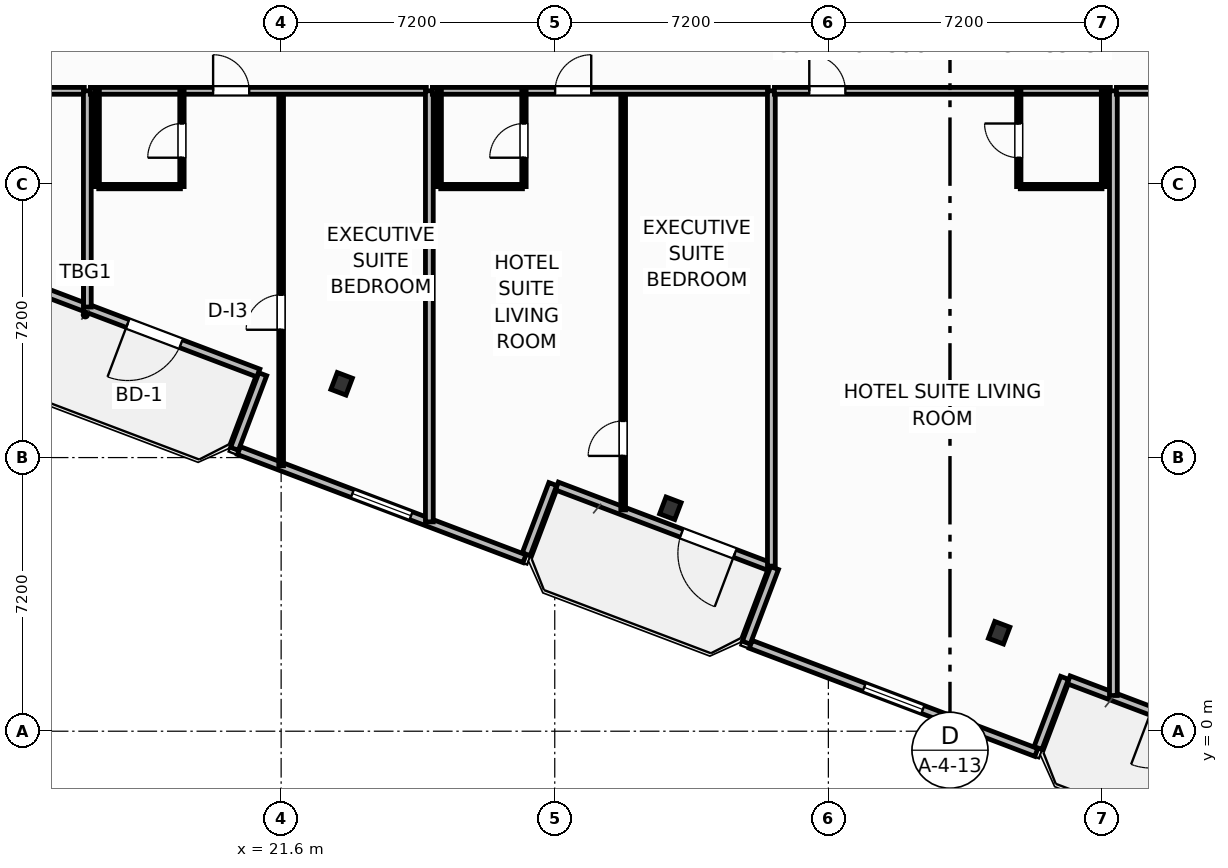
"""IFC4 building model, lengths in metres.
Left out: names, types, materials, properties, quantities, classifications, styles, units other than length and angle.
Written with IfcOpenShell. Run it as: python <this file> out.ifc"""

import sys

from ifc_helpers import new_model, si_unit, direction, frame, frame_2d, origin, origin_2d, place, context, subcontext, project, spatial, rectangle, i_section, extrude, element, fill, save


model = new_model("IFC4")
c1 = context("Model", 3, precision=1e-05, world=origin(), true_north=direction((0.0, 1.0)))
c2 = subcontext(c1, "Body", "Model", "MODEL_VIEW")
j1 = project(units=[si_unit("LENGTHUNIT", "METRE"), si_unit("PLANEANGLEUNIT", "RADIAN")], contexts=[c1])
p1 = place(None, origin())
s1 = spatial("IfcSite", under=j1, at=p1, CompositionType="ELEMENT")
p2 = place(p1, origin())
s2 = spatial("IfcBuilding", under=s1, at=p2, CompositionType="ELEMENT")
p3 = place(p2, frame((0.0, 0.0, 76.2)))
s3 = spatial("IfcBuildingStorey", under=s2, at=p3, CompositionType="ELEMENT", Elevation=76.2)
for number, where, z_axis, x_axis in (
    (1, (23.192, 9.141, 0.0), (0.0, 0.0, 1.0), (0.935, -0.354, 0.0)),
    (2, (31.843, 5.866, 0.0), (0.0, 0.0, 1.0), (0.935, -0.354, 0.0)),
    (3, (40.493, 2.591, 0.0), (0.0, 0.0, 1.0), (0.935, -0.354, 0.0)),
):
    element("IfcColumn", number, at=place(p3, frame(where, z_axis=z_axis, x_axis=x_axis)), inside=s3, PredefinedType="COLUMN", context=c2, shape_type="SweptSolid", body=[
        extrude(i_section(OverallWidth=0.424, OverallDepth=0.474, WebThickness=0.048, FlangeThickness=0.077, FilletRadius=0.025, at=origin_2d()), origin(), (0.0, 0.0, 1.0), 3.7),
    ])
p4 = place(p3, frame((21.0, 9.425, 0.0), z_axis=(0.0, 0.0, 1.0), x_axis=(-0.93521416643, 0.354082565101, 0.0)))
e4 = element("IfcWall", 4, at=p4, inside=s3, PredefinedType="SOLIDWALL", context=c2, shape_type="SweptSolid", body=[
    extrude(rectangle(XDim=6.0, YDim=0.22, at=frame_2d((3.0, 0.0))), origin(), (0.0, 0.0, 1.0), 2.73),
])
p5 = place(p4, frame((2.176, 0.0, 0.0)))
e5 = element("IfcOpeningElement", 5, at=p5, cuts=e4, PredefinedType="OPENING", context=c2, shape_type="SweptSolid", body=[
    extrude(rectangle(XDim=1.5, YDim=2.25, at=frame_2d((0.75, 1.125))), frame((0.0, 0.12, 0.0), z_axis=(0.0, -1.0, 0.0), x_axis=(1.0, 0.0, 0.0)), (0.0, 0.0, 1.0), 0.24),
])
p6 = place(p3, frame((34.468, 4.327, 0.0), z_axis=(0.0, 0.0, 1.0), x_axis=(-0.9352192676, 0.354069091436, 0.0)))
e6 = element("IfcWall", 6, at=p6, inside=s3, PredefinedType="SOLIDWALL", context=c2, shape_type="SweptSolid", body=[
    extrude(rectangle(XDim=6.0, YDim=0.22, at=frame_2d((3.0, 0.0))), origin(), (0.0, 0.0, 1.0), 2.73),
])
p7 = place(p6, frame((0.992, 0.0, 0.0)))
e7 = element("IfcOpeningElement", 7, at=p7, cuts=e6, PredefinedType="OPENING", context=c2, shape_type="SweptSolid", body=[
    extrude(rectangle(XDim=1.5, YDim=2.25, at=frame_2d((0.75, 1.125))), frame((0.0, 0.12, 0.0), z_axis=(0.0, -1.0, 0.0), x_axis=(1.0, 0.0, 0.0)), (0.0, 0.0, 1.0), 0.24),
])
p8 = place(p3, frame((47.935, -0.771, 0.0), z_axis=(0.0, 0.0, 1.0), x_axis=(-0.935227640088, 0.354046976001, 0.0)))
e8 = element("IfcWall", 8, at=p8, inside=s3, PredefinedType="SOLIDWALL", context=c2, shape_type="SweptSolid", body=[
    extrude(rectangle(XDim=6.0, YDim=0.22, at=frame_2d((3.0, 0.0))), origin(), (0.0, 0.0, 1.0), 2.73),
])
p9 = place(p8, frame((2.176, 0.0, 0.0)))
e9 = element("IfcOpeningElement", 9, at=p9, cuts=e8, PredefinedType="OPENING", context=c2, shape_type="SweptSolid", body=[
    extrude(rectangle(XDim=1.5, YDim=2.25, at=frame_2d((0.75, 1.125))), frame((0.0, 0.12, 0.0), z_axis=(0.0, -1.0, 0.0), x_axis=(1.0, 0.0, 0.0)), (0.0, 0.0, 1.0), 0.24),
])
p10 = place(p3, frame((21.116, 9.392, 0.0), z_axis=(0.0, 0.0, 1.0), x_axis=(-0.353988291547, -0.935249854022, 0.0)))
e10 = element("IfcWall", 10, at=p10, inside=s3, PredefinedType="SOLIDWALL", context=c2, shape_type="SweptSolid", body=[
    extrude(rectangle(XDim=2.1, YDim=0.22, at=frame_2d((1.05, 0.0))), origin(), (0.0, 0.0, 1.0), 2.73),
])
p11 = place(p3, frame((20.49, 7.384, 0.0), z_axis=(0.0, 0.0, 1.0), x_axis=(0.935230796934, -0.354038636968, 0.0)))
e11 = element("IfcWall", 11, at=p11, inside=s3, PredefinedType="SOLIDWALL", context=c2, shape_type="SweptSolid", body=[
    extrude(rectangle(XDim=8.035, YDim=0.22, at=frame_2d((4.018, 0.0))), origin(), (0.0, 0.0, 1.0), 2.73),
])
p12 = place(p11, frame((3.192, 0.0, 0.8)))
e12 = element("IfcOpeningElement", 12, at=p12, cuts=e11, PredefinedType="OPENING", context=c2, shape_type="SweptSolid", body=[
    extrude(rectangle(XDim=1.65, YDim=1.65, at=frame_2d((0.825, 0.825))), frame((0.0, 0.12, 0.0), z_axis=(0.0, -1.0, 0.0), x_axis=(1.0, 0.0, 0.0)), (0.0, 0.0, 1.0), 0.24),
])
p13 = place(p3, frame((28.048, 4.656, 0.0), z_axis=(0.0, 0.0, 1.0), x_axis=(0.354128791944, 0.935196663123, 0.0)))
e13 = element("IfcWall", 13, at=p13, inside=s3, PredefinedType="SOLIDWALL", context=c2, shape_type="SweptSolid", body=[
    extrude(rectangle(XDim=1.975, YDim=0.22, at=frame_2d((0.988, 0.0))), origin(), (0.0, 0.0, 1.0), 2.73),
])
p14 = place(p3, frame((34.583, 4.294, 0.0), z_axis=(0.0, 0.0, 1.0), x_axis=(-0.354128469405, -0.935196785258, 0.0)))
e14 = element("IfcWall", 14, at=p14, inside=s3, PredefinedType="SOLIDWALL", context=c2, shape_type="SweptSolid", body=[
    extrude(rectangle(XDim=2.1, YDim=0.22, at=frame_2d((1.05, 0.0))), origin(), (0.0, 0.0, 1.0), 2.73),
])
p15 = place(p3, frame((33.957, 2.286, 0.0), z_axis=(0.0, 0.0, 1.0), x_axis=(0.935220736163, -0.354065212427, 0.0)))
e15 = element("IfcWall", 15, at=p15, inside=s3, PredefinedType="SOLIDWALL", context=c2, shape_type="SweptSolid", body=[
    extrude(rectangle(XDim=8.035, YDim=0.22, at=frame_2d((4.018, 0.0))), origin(), (0.0, 0.0, 1.0), 2.73),
])
p16 = place(p15, frame((3.192, 0.0, 0.8)))
e16 = element("IfcOpeningElement", 16, at=p16, cuts=e15, PredefinedType="OPENING", context=c2, shape_type="SweptSolid", body=[
    extrude(rectangle(XDim=1.65, YDim=1.65, at=frame_2d((0.825, 0.825))), frame((0.0, 0.12, 0.0), z_axis=(0.0, -1.0, 0.0), x_axis=(1.0, 0.0, 0.0)), (0.0, 0.0, 1.0), 0.24),
])
p17 = place(p3, frame((41.516, -0.442, 0.0), z_axis=(0.0, 0.0, 1.0), x_axis=(0.354061611705, 0.935222099352, 0.0)))
e17 = element("IfcWall", 17, at=p17, inside=s3, PredefinedType="SOLIDWALL", context=c2, shape_type="SweptSolid", body=[
    extrude(rectangle(XDim=1.975, YDim=0.22, at=frame_2d((0.987, 0.0))), origin(), (0.0, 0.0, 1.0), 2.73),
])
p18 = place(p3, frame((1.58, 16.85, 0.0), z_axis=(0.0, 0.0, 1.0), x_axis=(1.0, 0.0, 0.0)))
e18 = element("IfcWall", 18, at=p18, inside=s3, PredefinedType="PARTITIONING", context=c2, shape_type="SweptSolid", body=[
    extrude(rectangle(XDim=14.84, YDim=0.18, at=frame_2d((7.42, 0.0))), origin(), (0.0, 0.0, 1.0), 3.45),
])
p19 = place(p18, frame((11.705, 0.0, 0.0)))
e19 = element("IfcOpeningElement", 19, at=p19, cuts=e18, PredefinedType="OPENING", context=c2, shape_type="SweptSolid", body=[
    extrude(rectangle(XDim=0.95, YDim=2.15, at=frame_2d((0.475, 1.075))), frame((0.0, 0.1, 0.0), z_axis=(0.0, -1.0, 0.0), x_axis=(1.0, 0.0, 0.0)), (0.0, 0.0, 1.0), 0.2),
])
p20 = place(p3, frame((16.5, 11.161, 0.0), z_axis=(0.0, 0.0, 1.0), x_axis=(0.0, 1.0, 0.0)))
e20 = element("IfcWall", 20, at=p20, inside=s3, PredefinedType="PARTITIONING", context=c2, shape_type="SweptSolid", body=[
    extrude(rectangle(XDim=5.689, YDim=0.205, at=frame_2d((2.844, 0.0))), origin(), (0.0, 0.0, 1.0), 3.45),
])
p21 = place(p3, frame((21.6, 6.985, 0.0), z_axis=(0.0, 0.0, 1.0), x_axis=(0.0, 1.0, 0.0)))
e21 = element("IfcWall", 21, at=p21, inside=s3, PredefinedType="PARTITIONING", context=c2, shape_type="SweptSolid", body=[
    extrude(rectangle(XDim=9.865, YDim=0.125, at=frame_2d((4.933, 0.0))), origin(), (0.0, 0.0, 1.0), 3.45),
])
p22 = place(p21, frame((3.578, 0.0, 0.0)))
e22 = element("IfcOpeningElement", 22, at=p22, cuts=e21, PredefinedType="OPENING", context=c2, shape_type="SweptSolid", body=[
    extrude(rectangle(XDim=0.92, YDim=2.05, at=frame_2d((0.46, 1.025))), frame((0.0, 0.073, 0.0), z_axis=(0.0, -1.0, 0.0), x_axis=(1.0, 0.0, 0.0)), (0.0, 0.0, 1.0), 0.145),
])
p23 = place(p3, frame((16.58, 16.85, 0.0), z_axis=(0.0, 0.0, 1.0), x_axis=(1.0, 0.0, 0.0)))
e23 = element("IfcWall", 23, at=p23, inside=s3, PredefinedType="PARTITIONING", context=c2, shape_type="SweptSolid", body=[
    extrude(rectangle(XDim=8.84, YDim=0.18, at=frame_2d((4.42, 0.0))), origin(), (0.0, 0.0, 1.0), 3.45),
])
p24 = place(p23, frame((3.23, 0.0, 0.0)))
e24 = element("IfcOpeningElement", 24, at=p24, cuts=e23, PredefinedType="OPENING", context=c2, shape_type="SweptSolid", body=[
    extrude(rectangle(XDim=0.95, YDim=2.15, at=frame_2d((0.475, 1.075))), frame((0.0, 0.1, 0.0), z_axis=(0.0, -1.0, 0.0), x_axis=(1.0, 0.0, 0.0)), (0.0, 0.0, 1.0), 0.2),
])
p25 = place(p3, frame((16.8, 14.33, 0.0), z_axis=(0.0, 0.0, 1.0), x_axis=(1.0, 0.0, 0.0)))
e25 = element("IfcWall", 25, at=p25, inside=s3, PredefinedType="PARTITIONING", context=c2, shape_type="SweptSolid", body=[
    extrude(rectangle(XDim=2.15, YDim=0.115, at=frame_2d((1.075, 0.0))), origin(), (0.0, 0.0, 1.0), 3.45),
])
p26 = place(p3, frame((18.99, 14.33, 0.0), z_axis=(0.0, 0.0, 1.0), x_axis=(0.0, 1.0, 0.0)))
e26 = element("IfcWall", 26, at=p26, inside=s3, PredefinedType="PARTITIONING", context=c2, shape_type="SweptSolid", body=[
    extrude(rectangle(XDim=2.52, YDim=0.115, at=frame_2d((1.26, 0.0))), origin(), (0.0, 0.0, 1.0), 3.45),
])
p27 = place(p26, frame((0.76, 0.0, 0.0)))
e27 = element("IfcOpeningElement", 27, at=p27, cuts=e26, PredefinedType="OPENING", context=c2, shape_type="SweptSolid", body=[
    extrude(rectangle(XDim=0.9, YDim=2.05, at=frame_2d((0.45, 1.025))), frame((0.0, 0.067, 0.0), z_axis=(0.0, -1.0, 0.0), x_axis=(1.0, 0.0, 0.0)), (0.0, 0.0, 1.0), 0.135),
])
p28 = place(p3, frame((16.76, 14.33, 0.0), z_axis=(0.0, 0.0, 1.0), x_axis=(0.0, 1.0, 0.0)))
e28 = element("IfcWall", 28, at=p28, inside=s3, PredefinedType="PARTITIONING", context=c2, shape_type="SweptSolid", body=[
    extrude(rectangle(XDim=2.52, YDim=0.115, at=frame_2d((1.26, 0.0))), origin(), (0.0, 0.0, 1.0), 3.45),
])
p29 = place(p3, frame((25.5, 5.509, 0.0), z_axis=(0.0, 0.0, 1.0), x_axis=(0.0, 1.0, 0.0)))
e29 = element("IfcWall", 29, at=p29, inside=s3, PredefinedType="PARTITIONING", context=c2, shape_type="SweptSolid", body=[
    extrude(rectangle(XDim=11.342, YDim=0.205, at=frame_2d((5.671, 0.0))), origin(), (0.0, 0.0, 1.0), 3.45),
])
p30 = place(p3, frame((30.6, 5.823, 0.0), z_axis=(0.0, 0.0, 1.0), x_axis=(0.0, 1.0, 0.0)))
e30 = element("IfcWall", 30, at=p30, inside=s3, PredefinedType="PARTITIONING", context=c2, shape_type="SweptSolid", body=[
    extrude(rectangle(XDim=11.027, YDim=0.125, at=frame_2d((5.513, 0.0))), origin(), (0.0, 0.0, 1.0), 3.45),
])
p31 = place(p30, frame((1.42, 0.0, 0.0)))
e31 = element("IfcOpeningElement", 31, at=p31, cuts=e30, PredefinedType="OPENING", context=c2, shape_type="SweptSolid", body=[
    extrude(rectangle(XDim=0.92, YDim=2.05, at=frame_2d((0.46, 1.025))), frame((0.0, 0.073, 0.0), z_axis=(0.0, -1.0, 0.0), x_axis=(1.0, 0.0, 0.0)), (0.0, 0.0, 1.0), 0.145),
])
p32 = place(p3, frame((25.58, 16.85, 0.0), z_axis=(0.0, 0.0, 1.0), x_axis=(1.0, 0.0, 0.0)))
e32 = element("IfcWall", 32, at=p32, inside=s3, PredefinedType="PARTITIONING", context=c2, shape_type="SweptSolid", body=[
    extrude(rectangle(XDim=8.84, YDim=0.18, at=frame_2d((4.42, 0.0))), origin(), (0.0, 0.0, 1.0), 3.45),
])
p33 = place(p32, frame((3.23, 0.0, 0.0)))
e33 = element("IfcOpeningElement", 33, at=p33, cuts=e32, PredefinedType="OPENING", context=c2, shape_type="SweptSolid", body=[
    extrude(rectangle(XDim=0.95, YDim=2.15, at=frame_2d((0.475, 1.075))), frame((0.0, 0.1, 0.0), z_axis=(0.0, -1.0, 0.0), x_axis=(1.0, 0.0, 0.0)), (0.0, 0.0, 1.0), 0.2),
])
p34 = place(p3, frame((25.8, 14.33, 0.0), z_axis=(0.0, 0.0, 1.0), x_axis=(1.0, 0.0, 0.0)))
e34 = element("IfcWall", 34, at=p34, inside=s3, PredefinedType="PARTITIONING", context=c2, shape_type="SweptSolid", body=[
    extrude(rectangle(XDim=2.15, YDim=0.115, at=frame_2d((1.075, 0.0))), origin(), (0.0, 0.0, 1.0), 3.45),
])
p35 = place(p3, frame((27.99, 14.33, 0.0), z_axis=(0.0, 0.0, 1.0), x_axis=(0.0, 1.0, 0.0)))
e35 = element("IfcWall", 35, at=p35, inside=s3, PredefinedType="PARTITIONING", context=c2, shape_type="SweptSolid", body=[
    extrude(rectangle(XDim=2.52, YDim=0.115, at=frame_2d((1.26, 0.0))), origin(), (0.0, 0.0, 1.0), 3.45),
])
p36 = place(p35, frame((0.76, 0.0, 0.0)))
e36 = element("IfcOpeningElement", 36, at=p36, cuts=e35, PredefinedType="OPENING", context=c2, shape_type="SweptSolid", body=[
    extrude(rectangle(XDim=0.9, YDim=2.05, at=frame_2d((0.45, 1.025))), frame((0.0, 0.067, 0.0), z_axis=(0.0, -1.0, 0.0), x_axis=(1.0, 0.0, 0.0)), (0.0, 0.0, 1.0), 0.135),
])
p37 = place(p3, frame((25.76, 14.33, 0.0), z_axis=(0.0, 0.0, 1.0), x_axis=(0.0, 1.0, 0.0)))
e37 = element("IfcWall", 37, at=p37, inside=s3, PredefinedType="PARTITIONING", context=c2, shape_type="SweptSolid", body=[
    extrude(rectangle(XDim=2.52, YDim=0.115, at=frame_2d((1.26, 0.0))), origin(), (0.0, 0.0, 1.0), 3.45),
])
p38 = place(p3, frame((34.5, 4.344, 0.0), z_axis=(0.0, 0.0, 1.0), x_axis=(0.0, 1.0, 0.0)))
e38 = element("IfcWall", 38, at=p38, inside=s3, PredefinedType="PARTITIONING", context=c2, shape_type="SweptSolid", body=[
    extrude(rectangle(XDim=12.506, YDim=0.205, at=frame_2d((6.253, 0.0))), origin(), (0.0, 0.0, 1.0), 3.45),
])
p39 = place(p3, frame((34.58, 16.85, 0.0), z_axis=(0.0, 0.0, 1.0), x_axis=(1.0, 0.0, 0.0)))
e39 = element("IfcWall", 39, at=p39, inside=s3, PredefinedType="PARTITIONING", context=c2, shape_type="SweptSolid", body=[
    extrude(rectangle(XDim=8.84, YDim=0.18, at=frame_2d((4.42, 0.0))), origin(), (0.0, 0.0, 1.0), 3.45),
])
p40 = place(p39, frame((0.918, 0.0, 0.0)))
e40 = element("IfcOpeningElement", 40, at=p40, cuts=e39, PredefinedType="OPENING", context=c2, shape_type="SweptSolid", body=[
    extrude(rectangle(XDim=0.95, YDim=2.15, at=frame_2d((0.475, 1.075))), frame((0.0, 0.1, 0.0), z_axis=(0.0, -1.0, 0.0), x_axis=(1.0, 0.0, 0.0)), (0.0, 0.0, 1.0), 0.2),
])
p41 = place(p3, frame((41.05, 14.33, 0.0), z_axis=(0.0, 0.0, 1.0), x_axis=(1.0, 0.0, 0.0)))
e41 = element("IfcWall", 41, at=p41, inside=s3, PredefinedType="PARTITIONING", context=c2, shape_type="SweptSolid", body=[
    extrude(rectangle(XDim=2.15, YDim=0.115, at=frame_2d((1.075, 0.0))), origin(), (0.0, 0.0, 1.0), 3.45),
])
p42 = place(p3, frame((41.01, 14.33, 0.0), z_axis=(0.0, 0.0, 1.0), x_axis=(0.0, 1.0, 0.0)))
e42 = element("IfcWall", 42, at=p42, inside=s3, PredefinedType="PARTITIONING", context=c2, shape_type="SweptSolid", body=[
    extrude(rectangle(XDim=2.52, YDim=0.115, at=frame_2d((1.26, 0.0))), origin(), (0.0, 0.0, 1.0), 3.45),
])
p43 = place(p42, frame((0.76, 0.0, 0.0)))
e43 = element("IfcOpeningElement", 43, at=p43, cuts=e42, PredefinedType="OPENING", context=c2, shape_type="SweptSolid", body=[
    extrude(rectangle(XDim=0.9, YDim=2.05, at=frame_2d((0.45, 1.025))), frame((0.0, 0.067, 0.0), z_axis=(0.0, -1.0, 0.0), x_axis=(1.0, 0.0, 0.0)), (0.0, 0.0, 1.0), 0.135),
])
p44 = place(p3, frame((43.24, 14.33, 0.0), z_axis=(0.0, 0.0, 1.0), x_axis=(0.0, 1.0, 0.0)))
e44 = element("IfcWall", 44, at=p44, inside=s3, PredefinedType="PARTITIONING", context=c2, shape_type="SweptSolid", body=[
    extrude(rectangle(XDim=2.52, YDim=0.115, at=frame_2d((1.26, 0.0))), origin(), (0.0, 0.0, 1.0), 2.58),
])
p45 = place(p3, frame((43.5, 0.939, 0.0), z_axis=(0.0, 0.0, 1.0), x_axis=(0.0, 1.0, 0.0)))
e45 = element("IfcWall", 45, at=p45, inside=s3, PredefinedType="PARTITIONING", context=c2, shape_type="SweptSolid", body=[
    extrude(rectangle(XDim=15.911, YDim=0.205, at=frame_2d((7.955, 0.0))), origin(), (0.0, 0.0, 1.0), 2.58),
])
p46 = place(p3, frame((43.58, 16.85, 0.0), z_axis=(0.0, 0.0, 1.0), x_axis=(1.0, 0.0, 0.0)))
e46 = element("IfcWall", 46, at=p46, inside=s3, PredefinedType="PARTITIONING", context=c2, shape_type="SweptSolid", body=[
    extrude(rectangle(XDim=8.84, YDim=0.18, at=frame_2d((4.42, 0.0))), origin(), (0.0, 0.0, 1.0), 3.45),
])
p47 = place(p46, frame((0.918, 0.0, 0.0)))
e47 = element("IfcOpeningElement", 47, at=p47, cuts=e46, PredefinedType="OPENING", context=c2, shape_type="SweptSolid", body=[
    extrude(rectangle(XDim=0.95, YDim=2.15, at=frame_2d((0.475, 1.075))), frame((0.0, 0.1, 0.0), z_axis=(0.0, -1.0, 0.0), x_axis=(1.0, 0.0, 0.0)), (0.0, 0.0, 1.0), 0.2),
])
p48 = place(p5, origin())
e48 = element("IfcDoor", 48, at=p48, inside=s3, OperationType="SINGLE_SWING_RIGHT", PredefinedType="DOOR", context=c2, shape_type="SweptSolid", body=[
    extrude(rectangle(XDim=1.5, YDim=2.25, at=frame_2d((0.75, 1.125))), frame((0.0, 0.025, 0.0), z_axis=(0.0, -1.0, 0.0), x_axis=(1.0, 0.0, 0.0)), (0.0, 0.0, 1.0), 0.05),
])
fill(e5, e48)
p49 = place(p7, origin())
e49 = element("IfcDoor", 49, at=p49, inside=s3, OperationType="SINGLE_SWING_LEFT", PredefinedType="DOOR", context=c2, shape_type="SweptSolid", body=[
    extrude(rectangle(XDim=1.5, YDim=2.25, at=frame_2d((0.75, 1.125))), frame((0.0, 0.025, 0.0), z_axis=(0.0, -1.0, 0.0), x_axis=(1.0, 0.0, 0.0)), (0.0, 0.0, 1.0), 0.05),
])
fill(e7, e49)
p50 = place(p12, origin())
e50 = element("IfcWindow", 50, at=p50, inside=s3, PartitioningType="SINGLE_PANEL", PredefinedType="WINDOW", context=c2, shape_type="SweptSolid", body=[
    extrude(rectangle(XDim=1.65, YDim=1.65, at=frame_2d((0.825, 0.825))), frame((0.0, 0.03, 0.0), z_axis=(0.0, -1.0, 0.0), x_axis=(1.0, 0.0, 0.0)), (0.0, 0.0, 1.0), 0.06),
])
fill(e12, e50)
p51 = place(p16, origin())
e51 = element("IfcWindow", 51, at=p51, inside=s3, PartitioningType="SINGLE_PANEL", PredefinedType="WINDOW", context=c2, shape_type="SweptSolid", body=[
    extrude(rectangle(XDim=1.65, YDim=1.65, at=frame_2d((0.825, 0.825))), frame((0.0, 0.03, 0.0), z_axis=(0.0, -1.0, 0.0), x_axis=(1.0, 0.0, 0.0)), (0.0, 0.0, 1.0), 0.06),
])
fill(e16, e51)
p52 = place(p22, origin())
e52 = element("IfcDoor", 52, at=p52, inside=s3, OperationType="SINGLE_SWING_LEFT", PredefinedType="DOOR", context=c2, shape_type="SweptSolid", body=[
    extrude(rectangle(XDim=0.92, YDim=2.05, at=frame_2d((0.46, 1.025))), frame((0.0, 0.025, 0.0), z_axis=(0.0, -1.0, 0.0), x_axis=(1.0, 0.0, 0.0)), (0.0, 0.0, 1.0), 0.05),
])
fill(e22, e52)
p53 = place(p24, origin())
e53 = element("IfcDoor", 53, at=p53, inside=s3, OperationType="SINGLE_SWING_LEFT", PredefinedType="DOOR", context=c2, shape_type="SweptSolid", body=[
    extrude(rectangle(XDim=0.95, YDim=2.15, at=frame_2d((0.475, 1.075))), frame((0.0, 0.025, 0.0), z_axis=(0.0, -1.0, 0.0), x_axis=(1.0, 0.0, 0.0)), (0.0, 0.0, 1.0), 0.05),
])
fill(e24, e53)
p54 = place(p27, origin())
e54 = element("IfcDoor", 54, at=p54, inside=s3, OperationType="SINGLE_SWING_LEFT", PredefinedType="DOOR", context=c2, shape_type="SweptSolid", body=[
    extrude(rectangle(XDim=0.9, YDim=2.05, at=frame_2d((0.45, 1.025))), frame((0.0, 0.025, 0.0), z_axis=(0.0, -1.0, 0.0), x_axis=(1.0, 0.0, 0.0)), (0.0, 0.0, 1.0), 0.05),
])
fill(e27, e54)
p55 = place(p31, origin())
e55 = element("IfcDoor", 55, at=p55, inside=s3, OperationType="SINGLE_SWING_LEFT", PredefinedType="DOOR", context=c2, shape_type="SweptSolid", body=[
    extrude(rectangle(XDim=0.92, YDim=2.05, at=frame_2d((0.46, 1.025))), frame((0.0, 0.025, 0.0), z_axis=(0.0, -1.0, 0.0), x_axis=(1.0, 0.0, 0.0)), (0.0, 0.0, 1.0), 0.05),
])
fill(e31, e55)
p56 = place(p33, origin())
e56 = element("IfcDoor", 56, at=p56, inside=s3, OperationType="SINGLE_SWING_RIGHT", PredefinedType="DOOR", context=c2, shape_type="SweptSolid", body=[
    extrude(rectangle(XDim=0.95, YDim=2.15, at=frame_2d((0.475, 1.075))), frame((0.0, 0.025, 0.0), z_axis=(0.0, -1.0, 0.0), x_axis=(1.0, 0.0, 0.0)), (0.0, 0.0, 1.0), 0.05),
])
fill(e33, e56)
p57 = place(p36, origin())
e57 = element("IfcDoor", 57, at=p57, inside=s3, OperationType="SINGLE_SWING_LEFT", PredefinedType="DOOR", context=c2, shape_type="SweptSolid", body=[
    extrude(rectangle(XDim=0.9, YDim=2.05, at=frame_2d((0.45, 1.025))), frame((0.0, 0.025, 0.0), z_axis=(0.0, -1.0, 0.0), x_axis=(1.0, 0.0, 0.0)), (0.0, 0.0, 1.0), 0.05),
])
fill(e36, e57)
p58 = place(p40, origin())
e58 = element("IfcDoor", 58, at=p58, inside=s3, OperationType="SINGLE_SWING_LEFT", PredefinedType="DOOR", context=c2, shape_type="SweptSolid", body=[
    extrude(rectangle(XDim=0.95, YDim=2.15, at=frame_2d((0.475, 1.075))), frame((0.0, 0.025, 0.0), z_axis=(0.0, -1.0, 0.0), x_axis=(1.0, 0.0, 0.0)), (0.0, 0.0, 1.0), 0.05),
])
fill(e40, e58)
p59 = place(p43, origin())
e59 = element("IfcDoor", 59, at=p59, inside=s3, OperationType="SINGLE_SWING_RIGHT", PredefinedType="DOOR", context=c2, shape_type="SweptSolid", body=[
    extrude(rectangle(XDim=0.9, YDim=2.05, at=frame_2d((0.45, 1.025))), frame((0.0, 0.025, 0.0), z_axis=(0.0, -1.0, 0.0), x_axis=(1.0, 0.0, 0.0)), (0.0, 0.0, 1.0), 0.05),
])
fill(e43, e59)
save(model, sys.argv[1])
